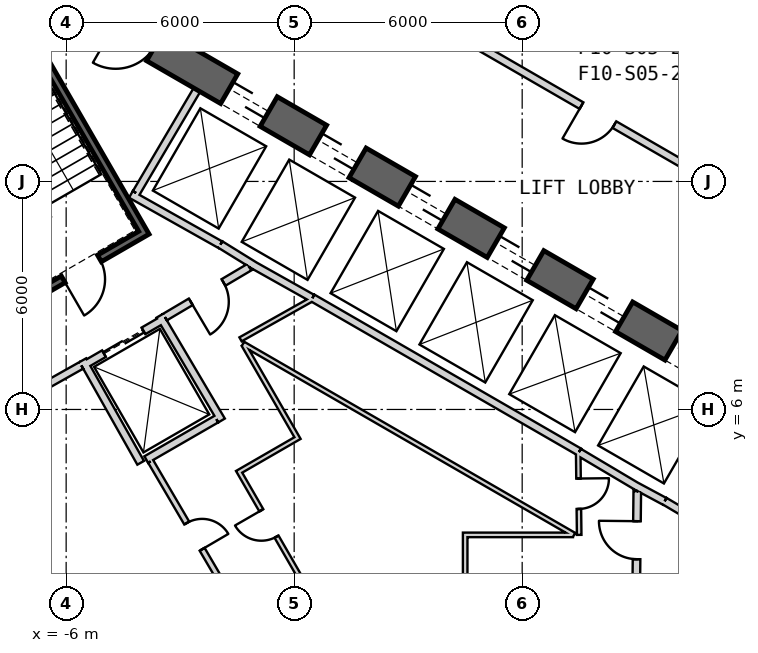
"""IFC4 building model, lengths in metres.
Left out: names, types, materials, properties, quantities, classifications, styles, units other than length and angle.
Written with IfcOpenShell. Run it as: python <this file> out.ifc"""

import sys

from ifc_helpers import new_model, si_unit, direction, frame, frame_2d, origin, place, context, subcontext, project, spatial, rectangle, extrude, element, fill, save


model = new_model("IFC4")
c1 = context("Model", 3, precision=1e-05, world=origin(), true_north=direction((0.0, 1.0)))
c2 = subcontext(c1, "Body", "Model", "MODEL_VIEW")
j1 = project(units=[si_unit("LENGTHUNIT", "METRE"), si_unit("PLANEANGLEUNIT", "RADIAN")], contexts=[c1])
p1 = place(None, origin())
s1 = spatial("IfcSite", under=j1, at=p1, CompositionType="ELEMENT")
p2 = place(p1, origin())
s2 = spatial("IfcBuilding", under=s1, at=p2, CompositionType="ELEMENT")
p3 = place(p2, frame((0.0, 0.0, 107.0)))
s3 = spatial("IfcBuildingStorey", under=s2, at=p3, CompositionType="ELEMENT", Elevation=107.0)
p4 = place(p3, frame((19.475, 2.208, 0.0), z_axis=(0.0, 0.0, 1.0), x_axis=(-0.866028369851, 0.499994862586, 0.0)))
e1 = element("IfcWall", 1, at=p4, inside=s3, PredefinedType="SHEAR", context=c2, shape_type="SweptSolid", body=[
    extrude(rectangle(XDim=31.523, YDim=0.9, at=frame_2d((15.762, 0.0))), origin(), (0.0, 0.0, 1.0), 4.1),
])
p5 = place(p4, frame((7.062, 0.0, 0.0)))
e2 = element("IfcOpeningElement", 2, at=p5, cuts=e1, PredefinedType="OPENING", context=c2, shape_type="SweptSolid", body=[
    extrude(rectangle(XDim=1.2, YDim=2.4, at=frame_2d((0.6, 1.2))), frame((0.0, 0.46, 0.0), z_axis=(0.0, -1.0, 0.0), x_axis=(1.0, 0.0, 0.0)), (0.0, 0.0, 1.0), 0.92),
])
p6 = place(p4, frame((9.762, 0.0, 0.0)))
e3 = element("IfcOpeningElement", 3, at=p6, cuts=e1, PredefinedType="OPENING", context=c2, shape_type="SweptSolid", body=[
    extrude(rectangle(XDim=1.2, YDim=2.4, at=frame_2d((0.6, 1.2))), frame((0.0, 0.46, 0.0), z_axis=(0.0, -1.0, 0.0), x_axis=(1.0, 0.0, 0.0)), (0.0, 0.0, 1.0), 0.92),
])
p7 = place(p4, frame((12.462, 0.0, 0.0)))
e4 = element("IfcOpeningElement", 4, at=p7, cuts=e1, PredefinedType="OPENING", context=c2, shape_type="SweptSolid", body=[
    extrude(rectangle(XDim=1.2, YDim=2.4, at=frame_2d((0.6, 1.2))), frame((0.0, 0.46, 0.0), z_axis=(0.0, -1.0, 0.0), x_axis=(1.0, 0.0, 0.0)), (0.0, 0.0, 1.0), 0.92),
])
p8 = place(p4, frame((15.162, 0.0, 0.0)))
e5 = element("IfcOpeningElement", 5, at=p8, cuts=e1, PredefinedType="OPENING", context=c2, shape_type="SweptSolid", body=[
    extrude(rectangle(XDim=1.2, YDim=2.4, at=frame_2d((0.6, 1.2))), frame((0.0, 0.46, 0.0), z_axis=(0.0, -1.0, 0.0), x_axis=(1.0, 0.0, 0.0)), (0.0, 0.0, 1.0), 0.92),
])
p9 = place(p4, frame((17.862, 0.0, 0.0)))
e6 = element("IfcOpeningElement", 6, at=p9, cuts=e1, PredefinedType="OPENING", context=c2, shape_type="SweptSolid", body=[
    extrude(rectangle(XDim=1.2, YDim=2.4, at=frame_2d((0.6, 1.2))), frame((0.0, 0.46, 0.0), z_axis=(0.0, -1.0, 0.0), x_axis=(1.0, 0.0, 0.0)), (0.0, 0.0, 1.0), 0.92),
])
p10 = place(p4, frame((20.562, 0.0, 0.0)))
e7 = element("IfcOpeningElement", 7, at=p10, cuts=e1, PredefinedType="OPENING", context=c2, shape_type="SweptSolid", body=[
    extrude(rectangle(XDim=1.2, YDim=2.4, at=frame_2d((0.6, 1.2))), frame((0.0, 0.46, 0.0), z_axis=(0.0, -1.0, 0.0), x_axis=(1.0, 0.0, 0.0)), (0.0, 0.0, 1.0), 0.92),
])
p11 = place(p4, frame((23.262, 0.0, 0.0)))
e8 = element("IfcOpeningElement", 8, at=p11, cuts=e1, PredefinedType="OPENING", context=c2, shape_type="SweptSolid", body=[
    extrude(rectangle(XDim=1.2, YDim=2.4, at=frame_2d((0.6, 1.2))), frame((0.0, 0.46, 0.0), z_axis=(0.0, -1.0, 0.0), x_axis=(1.0, 0.0, 0.0)), (0.0, 0.0, 1.0), 0.92),
])
p12 = place(p4, frame((3.612, 0.0, 0.0)))
e9 = element("IfcOpeningElement", 9, at=p12, cuts=e1, PredefinedType="OPENING", context=c2, shape_type="SweptSolid", body=[
    extrude(rectangle(XDim=1.2, YDim=2.4, at=frame_2d((0.6, 1.2))), frame((0.0, 0.46, 0.0), z_axis=(0.0, -1.0, 0.0), x_axis=(1.0, 0.0, 0.0)), (0.0, 0.0, 1.0), 0.92),
])
p13 = place(p4, frame((26.712, 0.0, 0.0)))
e10 = element("IfcOpeningElement", 10, at=p13, cuts=e1, PredefinedType="OPENING", context=c2, shape_type="SweptSolid", body=[
    extrude(rectangle(XDim=1.2, YDim=2.4, at=frame_2d((0.6, 1.2))), frame((0.0, 0.46, 0.0), z_axis=(0.0, -1.0, 0.0), x_axis=(1.0, 0.0, 0.0)), (0.0, 0.0, 1.0), 0.92),
])
p14 = place(p3, frame((7.497, 4.886, 0.0), z_axis=(0.0, 0.0, 1.0), x_axis=(-0.866030989016, 0.499990325971, 0.0)))
e11 = element("IfcWall", 11, at=p14, inside=s3, PredefinedType="PLUMBINGWALL", context=c2, shape_type="SweptSolid", body=[
    extrude(rectangle(XDim=8.1, YDim=0.2, at=frame_2d((4.05, 0.0))), origin(), (0.0, 0.0, 1.0), 3.8),
])
p15 = place(p3, frame((12.073, 2.211, 0.0), z_axis=(0.0, 0.0, 1.0), x_axis=(-0.860438357912, 0.509554542943, 0.0)))
e12 = element("IfcWall", 12, at=p15, inside=s3, PredefinedType="PLUMBINGWALL", context=c2, shape_type="SweptSolid", body=[
    extrude(rectangle(XDim=2.7, YDim=0.2, at=frame_2d((1.35, 0.0))), origin(), (0.0, 0.0, 1.0), 3.8),
])
p16 = place(p3, frame((9.748, 3.583, 0.0), z_axis=(0.0, 0.0, 1.0), x_axis=(-0.880917147855, 0.473270513147, 0.0)))
e13 = element("IfcWall", 13, at=p16, inside=s3, PredefinedType="PLUMBINGWALL", context=c2, shape_type="SweptSolid", body=[
    extrude(rectangle(XDim=0.878, YDim=0.2, at=frame_2d((0.439, 0.0))), origin(), (0.0, 0.0, 1.0), 3.8),
])
p17 = place(p3, frame((9.08, 3.937, 0.0), z_axis=(0.0, 0.0, 1.0), x_axis=(-0.859981807212, 0.510324691999, 0.0)))
e14 = element("IfcWall", 14, at=p17, inside=s3, PredefinedType="PLUMBINGWALL", context=c2, shape_type="SweptSolid", body=[
    extrude(rectangle(XDim=1.845, YDim=0.2, at=frame_2d((0.922, 0.0))), origin(), (0.0, 0.0, 1.0), 3.8),
])
p18 = place(p3, frame((-1.941, 10.339, 0.0), z_axis=(0.0, 0.0, 1.0), x_axis=(0.850216889117, -0.526432561171, 0.0)))
e15 = element("IfcWall", 15, at=p18, inside=s3, PredefinedType="PLUMBINGWALL", context=c2, shape_type="SweptSolid", body=[
    extrude(rectangle(XDim=1.078, YDim=0.2, at=frame_2d((0.539, 0.0))), origin(), (0.0, 0.0, 1.0), 3.8),
])
p19 = place(p3, frame((0.478, 8.928, 0.0), z_axis=(0.0, 0.0, 1.0), x_axis=(-0.871988740738, 0.489525929882, 0.0)))
e16 = element("IfcWall", 16, at=p19, inside=s3, PredefinedType="PLUMBINGWALL", context=c2, shape_type="SweptSolid", body=[
    extrude(rectangle(XDim=1.845, YDim=0.2, at=frame_2d((0.922, 0.0))), origin(), (0.0, 0.0, 1.0), 3.8),
])
p20 = place(p3, frame((-4.296, 11.659, 0.0), z_axis=(0.0, 0.0, 1.0), x_axis=(0.871534483978, -0.490334215854, 0.0)))
e17 = element("IfcWall", 17, at=p20, inside=s3, PredefinedType="PLUMBINGWALL", context=c2, shape_type="SweptSolid", body=[
    extrude(rectangle(XDim=2.7, YDim=0.2, at=frame_2d((1.35, 0.0))), origin(), (0.0, 0.0, 1.0), 3.8),
])
p21 = place(p3, frame((-4.158, 11.696, 0.0), z_axis=(0.0, 0.0, 1.0), x_axis=(0.508018930956, 0.861345903683, 0.0)))
e18 = element("IfcWall", 18, at=p21, inside=s3, PredefinedType="PLUMBINGWALL", context=c2, shape_type="SweptSolid", body=[
    extrude(rectangle(XDim=3.15, YDim=0.2, at=frame_2d((1.575, 0.0))), origin(), (0.0, 0.0, 1.0), 3.8),
])
p22 = place(p3, frame((-7.854, 17.405, -0.3), z_axis=(0.0, 0.0, 1.0), x_axis=(0.499997992926, -0.866026562566, 0.0)))
e19 = element("IfcWall", 19, at=p22, inside=s3, PredefinedType="SHEAR", context=c2, shape_type="SweptSolid", body=[
    extrude(rectangle(XDim=7.9, YDim=0.2, at=frame_2d((3.95, 0.0))), origin(), (0.0, 0.0, 1.0), 4.1),
])
p23 = place(p3, frame((-7.159, 8.8, -0.3), z_axis=(0.0, 0.0, 1.0), x_axis=(0.866047807691, 0.499961193289, 0.0)))
e20 = element("IfcWall", 20, at=p23, inside=s3, PredefinedType="SHEAR", context=c2, shape_type="SweptSolid", body=[
    extrude(rectangle(XDim=3.6, YDim=0.2, at=frame_2d((1.8, 0.0))), origin(), (0.0, 0.0, 1.0), 4.1),
])
p24 = place(p23, frame((1.25, 0.0, 0.3)))
e21 = element("IfcOpeningElement", 21, at=p24, cuts=e20, PredefinedType="OPENING", context=c2, shape_type="SweptSolid", body=[
    extrude(rectangle(XDim=1.1, YDim=2.1, at=frame_2d((0.55, 1.05))), frame((0.0, 0.11, 0.0), z_axis=(0.0, -1.0, 0.0), x_axis=(1.0, 0.0, 0.0)), (0.0, 0.0, 1.0), 0.22),
])
p25 = place(p3, frame((-5.524, 7.168, 0.0), z_axis=(0.0, 0.0, 1.0), x_axis=(0.866024647952, 0.500001309137, 0.0)))
e22 = element("IfcWall", 22, at=p25, inside=s3, PredefinedType="PLUMBINGWALL", context=c2, shape_type="SweptSolid", body=[
    extrude(rectangle(XDim=2.4, YDim=0.2, at=frame_2d((1.2, 0.0))), origin(), (0.0, 0.0, 1.0), 3.8),
])
p26 = place(p25, frame((0.6, 0.0, 0.0)))
e23 = element("IfcOpeningElement", 23, at=p26, cuts=e22, PredefinedType="OPENING", context=c2, shape_type="SweptSolid", body=[
    extrude(rectangle(XDim=1.2, YDim=2.4, at=frame_2d((0.6, 1.2))), frame((0.0, 0.11, 0.0), z_axis=(0.0, -1.0, 0.0), x_axis=(1.0, 0.0, 0.0)), (0.0, 0.0, 1.0), 0.22),
])
p27 = place(p3, frame((-4.039, 4.596, 0.0), z_axis=(0.0, 0.0, 1.0), x_axis=(-0.491322718731, 0.870977603649, 0.0)))
e24 = element("IfcWall", 24, at=p27, inside=s3, PredefinedType="PLUMBINGWALL", context=c2, shape_type="SweptSolid", body=[
    extrude(rectangle(XDim=3.1, YDim=0.2, at=frame_2d((1.55, 0.0))), origin(), (0.0, 0.0, 1.0), 3.8),
])
p28 = place(p3, frame((-3.538, 8.465, 0.0), z_axis=(0.0, 0.0, 1.0), x_axis=(0.508616218331, -0.860993346345, 0.0)))
e25 = element("IfcWall", 25, at=p28, inside=s3, PredefinedType="PLUMBINGWALL", context=c2, shape_type="SweptSolid", body=[
    extrude(rectangle(XDim=3.2, YDim=0.2, at=frame_2d((1.6, 0.0))), origin(), (0.0, 0.0, 1.0), 3.8),
])
p29 = place(p3, frame((-2.047, 5.746, 0.0), z_axis=(0.0, 0.0, 1.0), x_axis=(-0.866040491692, -0.499973866067, 0.0)))
e26 = element("IfcWall", 26, at=p29, inside=s3, PredefinedType="PLUMBINGWALL", context=c2, shape_type="SweptSolid", body=[
    extrude(rectangle(XDim=2.129, YDim=0.2, at=frame_2d((1.065, 0.0))), origin(), (0.0, 0.0, 1.0), 3.8),
])
p30 = place(p3, frame((9.001, 1.27, 0.0), z_axis=(0.0, 0.0, 1.0), x_axis=(0.010783593937, 0.99994185536, 0.0)))
e27 = element("IfcWall", 27, at=p30, inside=s3, PredefinedType="PARTITIONING", context=c2, shape_type="SweptSolid", body=[
    extrude(rectangle(XDim=2.581, YDim=0.2, at=frame_2d((1.291, 0.0))), origin(), (0.0, 0.0, 1.0), 3.8),
])
p31 = place(p30, frame((0.791, 0.0, 0.0)))
e28 = element("IfcOpeningElement", 28, at=p31, cuts=e27, PredefinedType="OPENING", context=c2, shape_type="SweptSolid", body=[
    extrude(rectangle(XDim=1.0, YDim=2.1, at=frame_2d((0.5, 1.05))), frame((0.0, 0.11, 0.0), z_axis=(0.0, -1.0, 0.0), x_axis=(1.0, 0.0, 0.0)), (0.0, 0.0, 1.0), 0.22),
])
p32 = place(p3, frame((-5.6, 7.16, 0.0), z_axis=(0.0, 0.0, 1.0), x_axis=(-0.871340486379, -0.490678873396, 0.0)))
e29 = element("IfcWall", 29, at=p32, inside=s3, PredefinedType="PARTITIONING", context=c2, shape_type="SweptSolid", body=[
    extrude(rectangle(XDim=2.581, YDim=0.2, at=frame_2d((1.291, 0.0))), origin(), (0.0, 0.0, 1.0), 3.8),
])
p33 = place(p3, frame((-1.179, 9.745, 0.0), z_axis=(0.0, 0.0, 1.0), x_axis=(-0.860598681535, -0.509283721849, 0.0)))
e30 = element("IfcWall", 30, at=p33, inside=s3, PredefinedType="PARTITIONING", context=c2, shape_type="SweptSolid", body=[
    extrude(rectangle(XDim=2.581, YDim=0.2, at=frame_2d((1.291, 0.0))), origin(), (0.0, 0.0, 1.0), 3.8),
])
p34 = place(p33, frame((0.791, 0.0, 0.0)))
e31 = element("IfcOpeningElement", 31, at=p34, cuts=e30, PredefinedType="OPENING", context=c2, shape_type="SweptSolid", body=[
    extrude(rectangle(XDim=1.0, YDim=2.1, at=frame_2d((0.5, 1.05))), frame((0.0, 0.11, 0.0), z_axis=(0.0, -1.0, 0.0), x_axis=(1.0, 0.0, 0.0)), (0.0, 0.0, 1.0), 0.22),
])
p35 = place(p3, frame((-1.407, 0.59, 0.0), z_axis=(0.0, 0.0, 1.0), x_axis=(-0.505502864584, 0.862824926562, 0.0)))
e32 = element("IfcWall", 32, at=p35, inside=s3, PredefinedType="PLUMBINGWALL", context=c2, shape_type="SweptSolid", body=[
    extrude(rectangle(XDim=4.686, YDim=0.15, at=frame_2d((2.343, 0.0))), origin(), (0.0, 0.0, 1.0), 3.8),
])
p36 = place(p35, frame((2.007, 0.0, 0.0)))
e33 = element("IfcOpeningElement", 33, at=p36, cuts=e32, PredefinedType="OPENING", context=c2, shape_type="SweptSolid", body=[
    extrude(rectangle(XDim=0.8, YDim=2.1, at=frame_2d((0.4, 1.05))), frame((0.0, 0.085, 0.0), z_axis=(0.0, -1.0, 0.0), x_axis=(1.0, 0.0, 0.0)), (0.0, 0.0, 1.0), 0.17),
])
p37 = place(p3, frame((7.367, 2.7, 0.0), z_axis=(0.0, 0.0, 1.0), x_axis=(-0.866027158831, 0.499996960157, 0.0)))
e34 = element("IfcWall", 34, at=p37, inside=s3, PredefinedType="PARTITIONING", context=c2, shape_type="SweptSolid", body=[
    extrude(rectangle(XDim=10.06, YDim=0.12, at=frame_2d((5.03, 0.0))), origin(), (0.0, 0.0, 1.0), 3.8),
])
p38 = place(p3, frame((0.475, 8.905, 0.0), z_axis=(0.0, 0.0, 1.0), x_axis=(-0.871843519779, -0.489784521009, 0.0)))
e35 = element("IfcWall", 35, at=p38, inside=s3, PredefinedType="PARTITIONING", context=c2, shape_type="SweptSolid", body=[
    extrude(rectangle(XDim=2.164, YDim=0.12, at=frame_2d((1.082, 0.0))), origin(), (0.0, 0.0, 1.0), 3.8),
])
p39 = place(p3, frame((7.5, 2.7, 0.0), z_axis=(0.0, 0.0, 1.0), x_axis=(-0.011729398337, 0.999931208241, 0.0)))
e36 = element("IfcWall", 36, at=p39, inside=s3, PredefinedType="PARTITIONING", context=c2, shape_type="SweptSolid", body=[
    extrude(rectangle(XDim=2.165, YDim=0.12, at=frame_2d((1.083, 0.0))), origin(), (0.0, 0.0, 1.0), 3.8),
])
p40 = place(p39, frame((0.682, 0.0, 0.0)))
e37 = element("IfcOpeningElement", 37, at=p40, cuts=e36, PredefinedType="OPENING", context=c2, shape_type="SweptSolid", body=[
    extrude(rectangle(XDim=0.8, YDim=2.1, at=frame_2d((0.4, 1.05))), frame((0.0, 0.07, 0.0), z_axis=(0.0, -1.0, 0.0), x_axis=(1.0, 0.0, 0.0)), (0.0, 0.0, 1.0), 0.14),
])
p41 = place(p3, frame((4.44, 2.7, 0.0), z_axis=(0.0, 0.0, 1.0), x_axis=(1.0, 0.0, 0.0)))
e38 = element("IfcWall", 38, at=p41, inside=s3, PredefinedType="PARTITIONING", context=c2, shape_type="SweptSolid", body=[
    extrude(rectangle(XDim=2.897, YDim=0.12, at=frame_2d((1.448, 0.0))), origin(), (0.0, 0.0, 1.0), 3.8),
])
p42 = place(p3, frame((4.5, 0.865, 0.0), z_axis=(0.0, 0.0, 1.0), x_axis=(0.0, 1.0, 0.0)))
e39 = element("IfcWall", 39, at=p42, inside=s3, PredefinedType="PARTITIONING", context=c2, shape_type="SweptSolid", body=[
    extrude(rectangle(XDim=1.775, YDim=0.12, at=frame_2d((0.887, 0.0))), origin(), (0.0, 0.0, 1.0), 3.8),
])
p43 = place(p3, frame((0.04, 1.677, 0.0), z_axis=(0.0, 0.0, 1.0), x_axis=(0.866029572143, -0.499992780121, 0.0)))
e40 = element("IfcWall", 40, at=p43, inside=s3, PredefinedType="PARTITIONING", context=c2, shape_type="SweptSolid", body=[
    extrude(rectangle(XDim=1.485, YDim=0.12, at=frame_2d((0.743, 0.0))), origin(), (0.0, 0.0, 1.0), 3.8),
])
p44 = place(p3, frame((-1.479, 4.412, 0.0), z_axis=(0.0, 0.0, 1.0), x_axis=(0.500013115284, -0.866017831539, 0.0)))
e41 = element("IfcWall", 41, at=p44, inside=s3, PredefinedType="PARTITIONING", context=c2, shape_type="SweptSolid", body=[
    extrude(rectangle(XDim=3.199, YDim=0.12, at=frame_2d((1.6, 0.0))), origin(), (0.0, 0.0, 1.0), 3.8),
])
p45 = place(p44, frame((1.229, 0.0, 0.0)))
e42 = element("IfcOpeningElement", 42, at=p45, cuts=e41, PredefinedType="OPENING", context=c2, shape_type="SweptSolid", body=[
    extrude(rectangle(XDim=0.8, YDim=2.1, at=frame_2d((0.4, 1.05))), frame((0.0, 0.07, 0.0), z_axis=(0.0, -1.0, 0.0), x_axis=(1.0, 0.0, 0.0)), (0.0, 0.0, 1.0), 0.14),
])
p46 = place(p3, frame((0.14, 5.277, 0.0), z_axis=(0.0, 0.0, 1.0), x_axis=(-0.866025242659, -0.500000279077, 0.0)))
e43 = element("IfcWall", 43, at=p46, inside=s3, PredefinedType="PARTITIONING", context=c2, shape_type="SweptSolid", body=[
    extrude(rectangle(XDim=1.775, YDim=0.12, at=frame_2d((0.887, 0.0))), origin(), (0.0, 0.0, 1.0), 3.8),
])
p47 = place(p3, frame((-1.33, 7.704, 0.0), z_axis=(0.0, 0.0, 1.0), x_axis=(0.500006584067, -0.866021602438, 0.0)))
e44 = element("IfcWall", 44, at=p47, inside=s3, PredefinedType="PARTITIONING", context=c2, shape_type="SweptSolid", body=[
    extrude(rectangle(XDim=2.777, YDim=0.12, at=frame_2d((1.388, 0.0))), origin(), (0.0, 0.0, 1.0), 3.8),
])
p48 = place(p3, frame((22.336, 5.464, 0.0), z_axis=(0.0, 0.0, 1.0), x_axis=(-0.866027503332, 0.499996363459, 0.0)))
e45 = element("IfcWall", 45, at=p48, inside=s3, PredefinedType="PARTITIONING", context=c2, shape_type="SweptSolid", body=[
    extrude(rectangle(XDim=33.022, YDim=0.2, at=frame_2d((16.511, 0.0))), origin(), (0.0, 0.0, 1.0), 2.98),
])
p49 = place(p48, frame((16.061, 0.0, 0.0)))
e46 = element("IfcOpeningElement", 46, at=p49, cuts=e45, PredefinedType="OPENING", context=c2, shape_type="SweptSolid", body=[
    extrude(rectangle(XDim=1.0, YDim=2.1, at=frame_2d((0.5, 1.05))), frame((0.0, 0.11, 0.0), z_axis=(0.0, -1.0, 0.0), x_axis=(1.0, 0.0, 0.0)), (0.0, 0.0, 1.0), 0.22),
])
p50 = place(p31, origin())
e47 = element("IfcDoor", 47, at=p50, inside=s3, OperationType="SINGLE_SWING_LEFT", PredefinedType="USERDEFINED", context=c2, shape_type="SweptSolid", body=[
    extrude(rectangle(XDim=1.0, YDim=2.1, at=frame_2d((0.5, 1.05))), frame((0.0, 0.025, 0.0), z_axis=(0.0, -1.0, 0.0), x_axis=(1.0, 0.0, 0.0)), (0.0, 0.0, 1.0), 0.05),
])
fill(e28, e47)
p51 = place(p24, origin())
e48 = element("IfcDoor", 48, at=p51, inside=s3, OperationType="SINGLE_SWING_LEFT", PredefinedType="USERDEFINED", context=c2, shape_type="SweptSolid", body=[
    extrude(rectangle(XDim=1.1, YDim=2.1, at=frame_2d((0.55, 1.05))), frame((0.0, 0.025, 0.0), z_axis=(0.0, -1.0, 0.0), x_axis=(1.0, 0.0, 0.0)), (0.0, 0.0, 1.0), 0.05),
])
fill(e21, e48)
p52 = place(p34, origin())
e49 = element("IfcDoor", 49, at=p52, inside=s3, OperationType="SINGLE_SWING_LEFT", PredefinedType="USERDEFINED", context=c2, shape_type="SweptSolid", body=[
    extrude(rectangle(XDim=1.0, YDim=2.1, at=frame_2d((0.5, 1.05))), frame((0.0, 0.025, 0.0), z_axis=(0.0, -1.0, 0.0), x_axis=(1.0, 0.0, 0.0)), (0.0, 0.0, 1.0), 0.05),
])
fill(e31, e49)
p53 = place(p26, origin())
e50 = element("IfcDoor", 50, at=p53, inside=s3, OperationType="SLIDING_TO_LEFT", PredefinedType="USERDEFINED", context=c2, shape_type="SweptSolid", body=[
    extrude(rectangle(XDim=1.2, YDim=2.4, at=frame_2d((0.6, 1.2))), frame((0.0, 0.025, 0.0), z_axis=(0.0, -1.0, 0.0), x_axis=(1.0, 0.0, 0.0)), (0.0, 0.0, 1.0), 0.05),
])
fill(e23, e50)
p54 = place(p36, origin())
e51 = element("IfcDoor", 51, at=p54, inside=s3, OperationType="SINGLE_SWING_RIGHT", PredefinedType="USERDEFINED", context=c2, shape_type="SweptSolid", body=[
    extrude(rectangle(XDim=0.8, YDim=2.1, at=frame_2d((0.4, 1.05))), frame((0.0, 0.025, 0.0), z_axis=(0.0, -1.0, 0.0), x_axis=(1.0, 0.0, 0.0)), (0.0, 0.0, 1.0), 0.05),
])
fill(e33, e51)
p55 = place(p40, origin())
e52 = element("IfcDoor", 52, at=p55, inside=s3, OperationType="SINGLE_SWING_RIGHT", PredefinedType="USERDEFINED", context=c2, shape_type="SweptSolid", body=[
    extrude(rectangle(XDim=0.8, YDim=2.1, at=frame_2d((0.4, 1.05))), frame((0.0, 0.025, 0.0), z_axis=(0.0, -1.0, 0.0), x_axis=(1.0, 0.0, 0.0)), (0.0, 0.0, 1.0), 0.05),
])
fill(e37, e52)
p56 = place(p45, origin())
e53 = element("IfcDoor", 53, at=p56, inside=s3, OperationType="SINGLE_SWING_RIGHT", PredefinedType="USERDEFINED", context=c2, shape_type="SweptSolid", body=[
    extrude(rectangle(XDim=0.8, YDim=2.1, at=frame_2d((0.4, 1.05))), frame((0.0, 0.025, 0.0), z_axis=(0.0, -1.0, 0.0), x_axis=(1.0, 0.0, 0.0)), (0.0, 0.0, 1.0), 0.05),
])
fill(e42, e53)
p57 = place(p49, origin())
e54 = element("IfcDoor", 54, at=p57, inside=s3, OperationType="SINGLE_SWING_RIGHT", PredefinedType="USERDEFINED", context=c2, shape_type="SweptSolid", body=[
    extrude(rectangle(XDim=1.0, YDim=2.1, at=frame_2d((0.5, 1.05))), frame((0.0, 0.025, 0.0), z_axis=(0.0, -1.0, 0.0), x_axis=(1.0, 0.0, 0.0)), (0.0, 0.0, 1.0), 0.05),
])
fill(e46, e54)
p58 = place(p6, origin())
e55 = element("IfcDoor", 55, at=p58, inside=s3, OperationType="SLIDING_TO_LEFT", PredefinedType="USERDEFINED", context=c2, shape_type="SweptSolid", body=[
    extrude(rectangle(XDim=1.2, YDim=2.4, at=frame_2d((0.6, 1.2))), frame((0.0, 0.025, 0.0), z_axis=(0.0, -1.0, 0.0), x_axis=(1.0, 0.0, 0.0)), (0.0, 0.0, 1.0), 0.05),
])
fill(e3, e55)
p59 = place(p7, origin())
e56 = element("IfcDoor", 56, at=p59, inside=s3, OperationType="SLIDING_TO_LEFT", PredefinedType="USERDEFINED", context=c2, shape_type="SweptSolid", body=[
    extrude(rectangle(XDim=1.2, YDim=2.4, at=frame_2d((0.6, 1.2))), frame((0.0, 0.025, 0.0), z_axis=(0.0, -1.0, 0.0), x_axis=(1.0, 0.0, 0.0)), (0.0, 0.0, 1.0), 0.05),
])
fill(e4, e56)
p60 = place(p8, origin())
e57 = element("IfcDoor", 57, at=p60, inside=s3, OperationType="SLIDING_TO_LEFT", PredefinedType="USERDEFINED", context=c2, shape_type="SweptSolid", body=[
    extrude(rectangle(XDim=1.2, YDim=2.4, at=frame_2d((0.6, 1.2))), frame((0.0, 0.025, 0.0), z_axis=(0.0, -1.0, 0.0), x_axis=(1.0, 0.0, 0.0)), (0.0, 0.0, 1.0), 0.05),
])
fill(e5, e57)
p61 = place(p9, origin())
e58 = element("IfcDoor", 58, at=p61, inside=s3, OperationType="SLIDING_TO_LEFT", PredefinedType="USERDEFINED", context=c2, shape_type="SweptSolid", body=[
    extrude(rectangle(XDim=1.2, YDim=2.4, at=frame_2d((0.6, 1.2))), frame((0.0, 0.025, 0.0), z_axis=(0.0, -1.0, 0.0), x_axis=(1.0, 0.0, 0.0)), (0.0, 0.0, 1.0), 0.05),
])
fill(e6, e58)
p62 = place(p10, origin())
e59 = element("IfcDoor", 59, at=p62, inside=s3, OperationType="SLIDING_TO_LEFT", PredefinedType="USERDEFINED", context=c2, shape_type="SweptSolid", body=[
    extrude(rectangle(XDim=1.2, YDim=2.4, at=frame_2d((0.6, 1.2))), frame((0.0, 0.025, 0.0), z_axis=(0.0, -1.0, 0.0), x_axis=(1.0, 0.0, 0.0)), (0.0, 0.0, 1.0), 0.05),
])
fill(e7, e59)
p63 = place(p11, origin())
e60 = element("IfcDoor", 60, at=p63, inside=s3, OperationType="SLIDING_TO_LEFT", PredefinedType="USERDEFINED", context=c2, shape_type="SweptSolid", body=[
    extrude(rectangle(XDim=1.2, YDim=2.4, at=frame_2d((0.6, 1.2))), frame((0.0, 0.025, 0.0), z_axis=(0.0, -1.0, 0.0), x_axis=(1.0, 0.0, 0.0)), (0.0, 0.0, 1.0), 0.05),
])
fill(e8, e60)
save(model, sys.argv[1])
